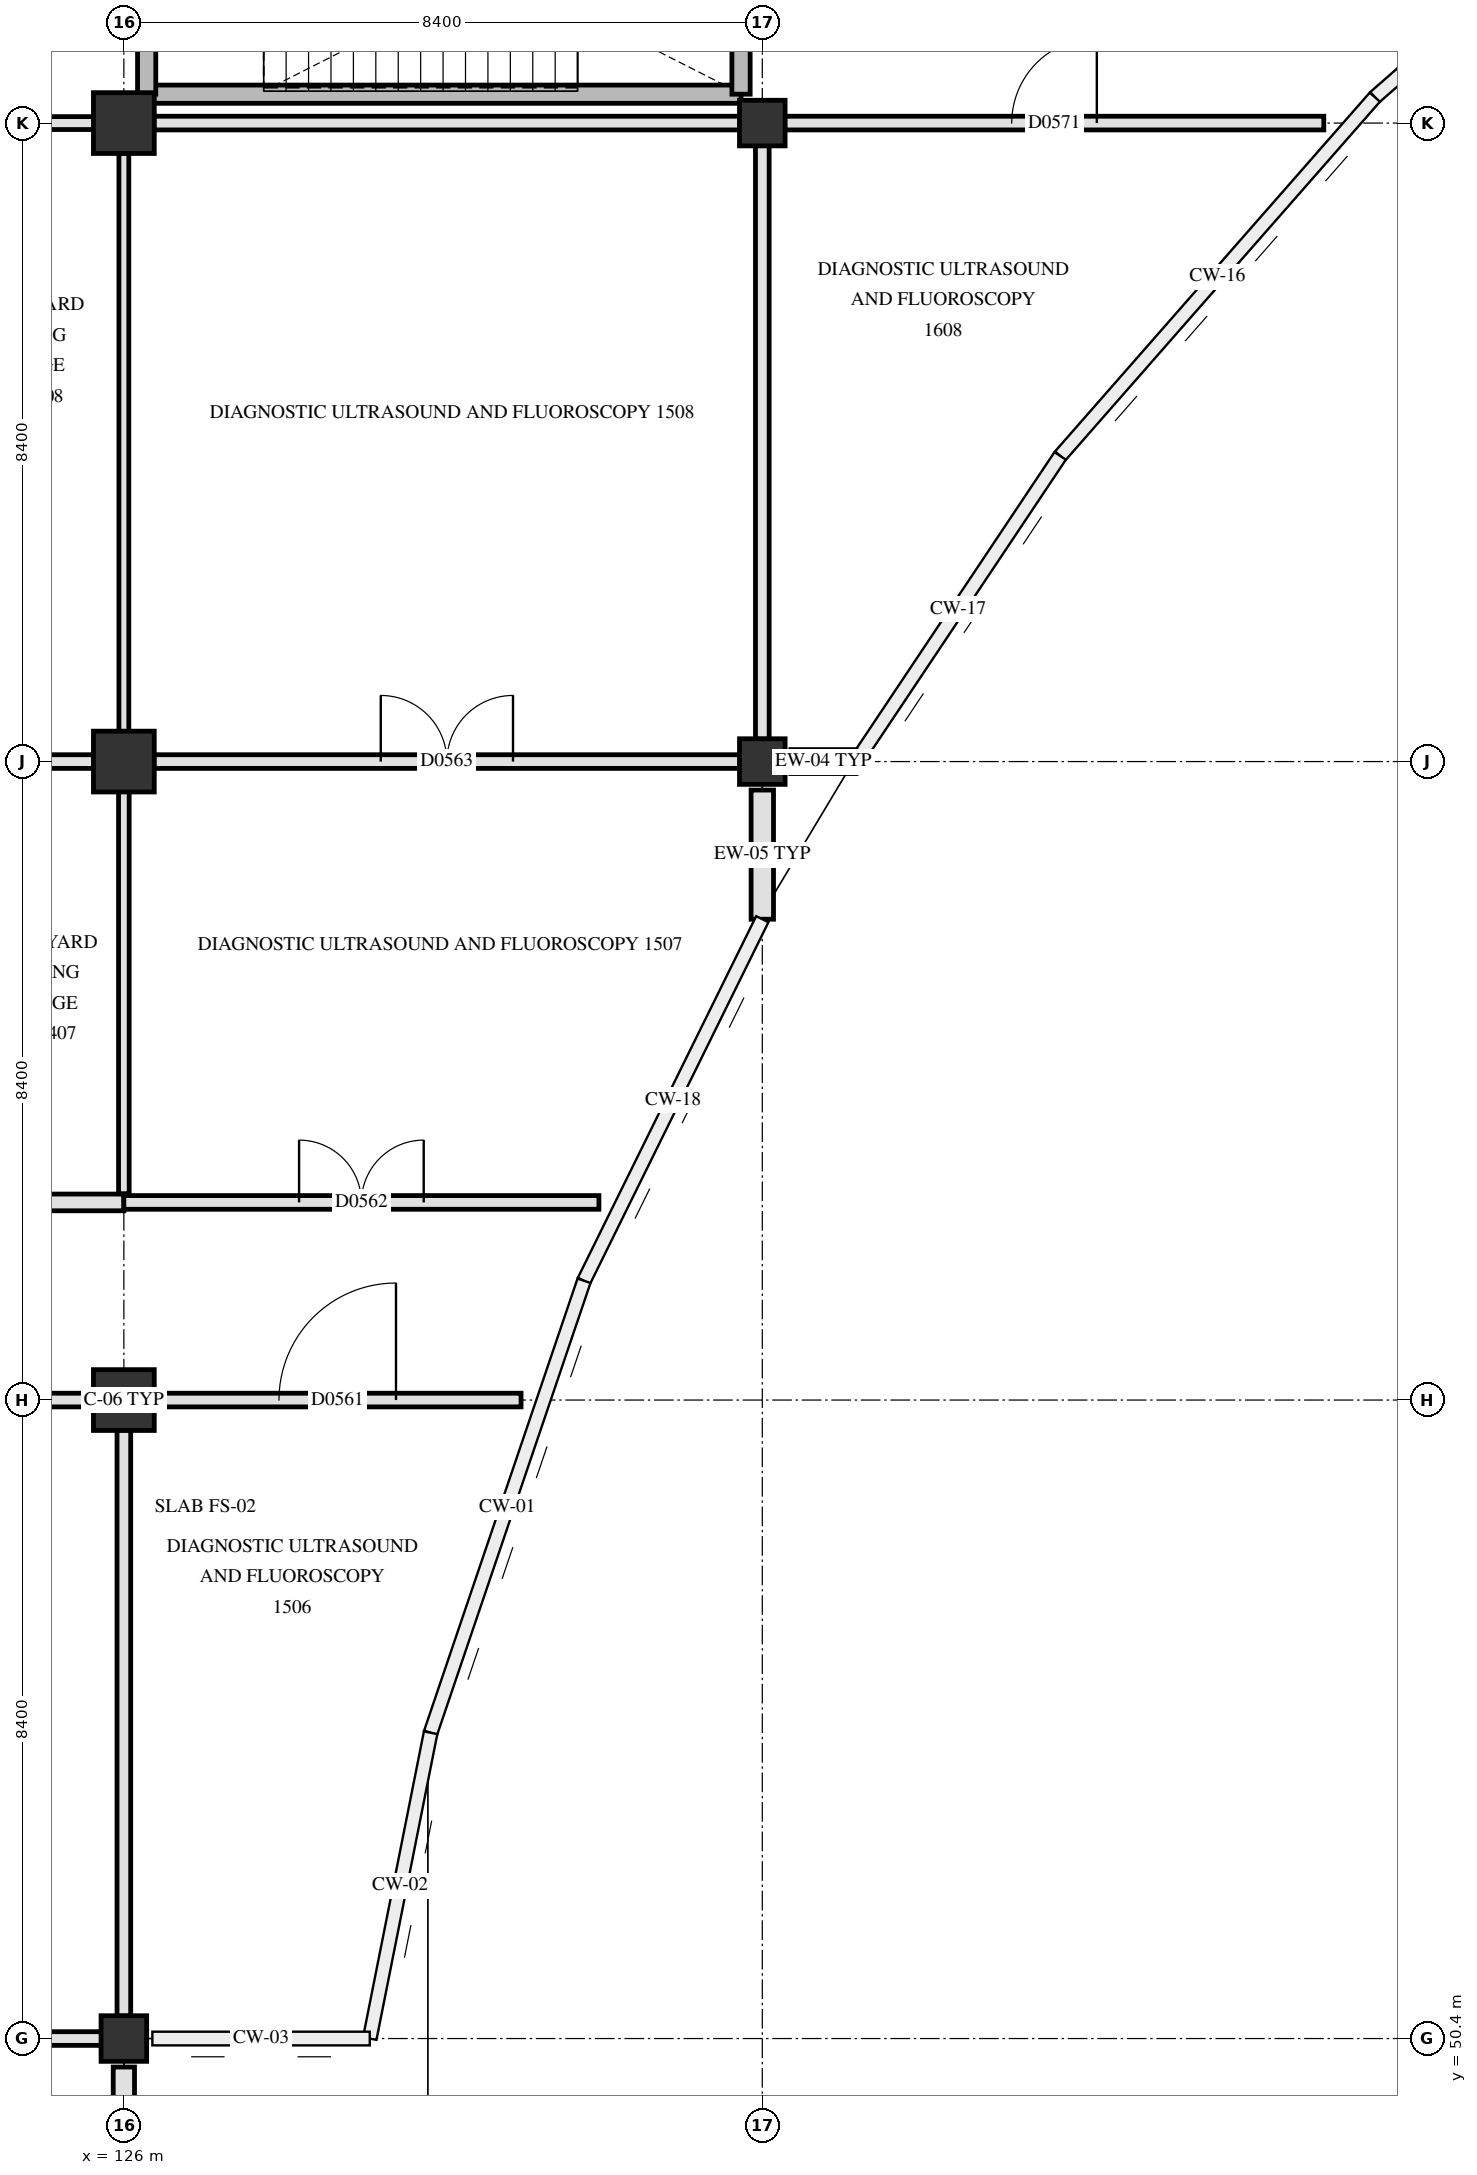
"""IFC4 building model, lengths in metres.
Left out: names, types, materials, properties, quantities, classifications, styles, units other than length and angle.
Written with IfcOpenShell. Run it as: python <this file> out.ifc"""

import sys

from ifc_helpers import new_model, si_unit, direction, frame, frame_2d, origin, origin_2d, place, context, subcontext, project, spatial, rectangle, circle, extrude, element, fill, save


model = new_model("IFC4")
c1 = context("Model", 3, precision=1e-05, world=origin(), true_north=direction((0.0, 1.0)))
c2 = subcontext(c1, "Body", "Model", "MODEL_VIEW")
j1 = project(units=[si_unit("LENGTHUNIT", "METRE"), si_unit("PLANEANGLEUNIT", "RADIAN")], contexts=[c1])
p1 = place(None, origin())
s1 = spatial("IfcSite", under=j1, at=p1, CompositionType="ELEMENT")
p2 = place(p1, origin())
s2 = spatial("IfcBuilding", under=s1, at=p2, CompositionType="ELEMENT")
p3 = place(p2, origin())
s3 = spatial("IfcBuildingStorey", under=s2, at=p3, CompositionType="ELEMENT", Elevation=0.0)
p4 = place(p3, frame((126.0, 50.4, 0.0), z_axis=(0.0, 0.0, 1.0), x_axis=(1.0, 0.0, 0.0)))
e1 = element("IfcColumn", 1, at=p4, inside=s3, PredefinedType="COLUMN", context=c2, shape_type="SweptSolid", body=[
    extrude(rectangle(XDim=0.6, YDim=0.6, at=origin_2d()), origin(), (0.0, 0.0, 1.0), 4.8),
])
for number, where, z_axis, x_axis in (
    (2, (126.0, 58.8, 0.0), (0.0, 0.0, 1.0), (1.0, 0.0, 0.0)),
    (3, (126.0, 67.2, 0.0), (0.0, 0.0, 1.0), (1.0, 0.0, 0.0)),
    (4, (126.0, 75.6, 0.0), (0.0, 0.0, 1.0), (1.0, 0.0, 0.0)),
):
    element("IfcColumn", number, at=place(p3, frame(where, z_axis=z_axis, x_axis=x_axis)), inside=s3, PredefinedType="COLUMN", context=c2, shape_type="SweptSolid", body=[
        extrude(circle(Radius=0.4, at=origin_2d()), origin(), (0.0, 0.0, 1.0), 4.8),
    ])
for number, where, z_axis, x_axis in (
    (5, (134.4, 67.2, 0.0), (0.0, 0.0, 1.0), (1.0, 0.0, 0.0)),
    (6, (134.4, 75.6, 0.0), (0.0, 0.0, 1.0), (1.0, 0.0, 0.0)),
):
    element("IfcColumn", number, at=place(p3, frame(where, z_axis=z_axis, x_axis=x_axis)), inside=s3, PredefinedType="COLUMN", context=c2, shape_type="SweptSolid", body=[
        extrude(rectangle(XDim=0.6, YDim=0.6, at=origin_2d()), origin(), (0.0, 0.0, 1.0), 4.8),
    ])
p5 = place(p3, frame((135.633, 67.2, 0.0), z_axis=(0.0, 0.0, 1.0), x_axis=(-1.0, 0.0, 0.0)))
e7 = element("IfcWall", 7, at=p5, inside=s3, PredefinedType="SOLIDWALL", context=c2, shape_type="SweptSolid", body=[
    extrude(rectangle(XDim=0.858, YDim=0.315, at=frame_2d((0.429, 0.0))), origin(), (0.0, 0.0, 1.0), 4.49),
])
p6 = place(p3, frame((134.4, 66.825, 0.0), z_axis=(0.0, 0.0, 1.0), x_axis=(0.0, -1.0, 0.0)))
e8 = element("IfcWall", 8, at=p6, inside=s3, PredefinedType="SOLIDWALL", context=c2, shape_type="SweptSolid", body=[
    extrude(rectangle(XDim=1.699, YDim=0.295, at=frame_2d((0.85, 0.0))), origin(), (0.0, 0.0, 1.0), 4.49),
])
p7 = place(p3, frame((126.0, 50.025, 0.0), z_axis=(0.0, 0.0, 1.0), x_axis=(0.0, -1.0, 0.0)))
e9 = element("IfcWall", 9, at=p7, inside=s3, PredefinedType="SOLIDWALL", context=c2, shape_type="SweptSolid", body=[
    extrude(rectangle(XDim=7.65, YDim=0.28, at=frame_2d((3.825, 0.0))), origin(), (0.0, 0.0, 1.0), 3.79),
])
p8 = place(p7, frame((1.312, 0.0, 0.85)))
e10 = element("IfcOpeningElement", 10, at=p8, cuts=e9, PredefinedType="OPENING", context=c2, shape_type="SweptSolid", body=[
    extrude(rectangle(XDim=1.2, YDim=1.42, at=frame_2d((0.6, 0.71))), frame((0.0, 0.15, 0.0), z_axis=(0.0, -1.0, 0.0), x_axis=(1.0, 0.0, 0.0)), (0.0, 0.0, 1.0), 0.3),
])
p9 = place(p7, frame((5.087, 0.0, 0.85)))
e11 = element("IfcOpeningElement", 11, at=p9, cuts=e9, PredefinedType="OPENING", context=c2, shape_type="SweptSolid", body=[
    extrude(rectangle(XDim=1.3, YDim=1.42, at=frame_2d((0.65, 0.71))), frame((0.0, 0.15, 0.0), z_axis=(0.0, -1.0, 0.0), x_axis=(1.0, 0.0, 0.0)), (0.0, 0.0, 1.0), 0.3),
])
p10 = place(p3, frame((126.3, 75.98, 0.0), z_axis=(0.0, 0.0, 1.0), x_axis=(1.0, 0.0, 0.0)))
e12 = element("IfcWall", 12, at=p10, inside=s3, PredefinedType="SHEAR", context=c2, shape_type="SweptSolid", body=[
    extrude(rectangle(XDim=7.82, YDim=0.24, at=frame_2d((3.91, 0.0))), origin(), (0.0, 0.0, 1.0), 4.5),
])
for number, where, z_axis, x_axis in (
    (13, (126.3, 75.98, 0.0), (0.0, 0.0, 1.0), (0.0, 1.0, 0.0)),
    (14, (134.12, 75.98, 0.0), (0.0, 0.0, 1.0), (0.0, 1.0, 0.0)),
):
    element("IfcWall", number, at=place(p3, frame(where, z_axis=z_axis, x_axis=x_axis)), inside=s3, PredefinedType="SHEAR", context=c2, shape_type="SweptSolid", body=[
        extrude(rectangle(XDim=3.32, YDim=0.24, at=frame_2d((1.66, 0.0))), origin(), (0.0, 0.0, 1.0), 4.5),
    ])
p11 = place(p3, frame((118.045, 50.4, 0.0), z_axis=(0.0, 0.0, 1.0), x_axis=(1.0, 0.0, 0.0)))
e15 = element("IfcWall", 15, at=p11, inside=s3, PredefinedType="PARTITIONING", context=c2, shape_type="SweptSolid", body=[
    extrude(rectangle(XDim=7.66, YDim=0.18, at=frame_2d((3.83, 0.0))), origin(), (0.0, 0.0, 1.0), 3.84),
])
p12 = place(p3, frame((117.995, 58.8, 0.0), z_axis=(0.0, 0.0, 1.0), x_axis=(1.0, 0.0, 0.0)))
e16 = element("IfcWall", 16, at=p12, inside=s3, PredefinedType="PARTITIONING", context=c2, shape_type="SweptSolid", body=[
    extrude(rectangle(XDim=7.61, YDim=0.18, at=frame_2d((3.805, 0.0))), origin(), (0.0, 0.0, 1.0), 3.84),
])
p13 = place(p12, frame((2.855, 0.0, 0.0)))
e17 = element("IfcOpeningElement", 17, at=p13, cuts=e16, PredefinedType="OPENING", context=c2, shape_type="SweptSolid", body=[
    extrude(rectangle(XDim=1.9, YDim=2.3, at=frame_2d((0.95, 1.15))), frame((0.0, 0.1, 0.0), z_axis=(0.0, -1.0, 0.0), x_axis=(1.0, 0.0, 0.0)), (0.0, 0.0, 1.0), 0.2),
])
p14 = place(p3, frame((126.395, 58.8, 0.0), z_axis=(0.0, 0.0, 1.0), x_axis=(1.0, 0.0, 0.0)))
e18 = element("IfcWall", 18, at=p14, inside=s3, PredefinedType="PARTITIONING", context=c2, shape_type="SweptSolid", body=[
    extrude(rectangle(XDim=4.831, YDim=0.18, at=frame_2d((2.416, 0.0))), origin(), (0.0, 0.0, 1.0), 4.49),
])
p15 = place(p14, frame((1.646, 0.0, 0.0)))
e19 = element("IfcOpeningElement", 19, at=p15, cuts=e18, PredefinedType="OPENING", context=c2, shape_type="SweptSolid", body=[
    extrude(rectangle(XDim=1.54, YDim=2.24, at=frame_2d((0.77, 1.12))), frame((0.0, 0.1, 0.0), z_axis=(0.0, -1.0, 0.0), x_axis=(1.0, 0.0, 0.0)), (0.0, 0.0, 1.0), 0.2),
])
p16 = place(p3, frame((121.075, 61.4, 0.0), z_axis=(0.0, 0.0, 1.0), x_axis=(1.0, 0.0, 0.0)))
e20 = element("IfcWall", 20, at=p16, inside=s3, PredefinedType="PARTITIONING", context=c2, shape_type="SweptSolid", body=[
    extrude(rectangle(XDim=4.925, YDim=0.22, at=frame_2d((2.462, 0.0))), origin(), (0.0, 0.0, 1.0), 3.89),
])
p17 = place(p16, frame((1.613, 0.0, 0.0)))
e21 = element("IfcOpeningElement", 21, at=p17, cuts=e20, PredefinedType="OPENING", context=c2, shape_type="SweptSolid", body=[
    extrude(rectangle(XDim=1.7, YDim=2.25, at=frame_2d((0.85, 1.125))), frame((0.0, 0.12, 0.0), z_axis=(0.0, -1.0, 0.0), x_axis=(1.0, 0.0, 0.0)), (0.0, 0.0, 1.0), 0.24),
])
p18 = place(p3, frame((126.0, 61.4, 0.0), z_axis=(0.0, 0.0, 1.0), x_axis=(1.0, 0.0, 0.0)))
e22 = element("IfcWall", 22, at=p18, inside=s3, PredefinedType="PARTITIONING", context=c2, shape_type="SweptSolid", body=[
    extrude(rectangle(XDim=6.25, YDim=0.18, at=frame_2d((3.125, 0.0))), origin(), (0.0, 0.0, 1.0), 3.89),
])
p19 = place(p18, frame((2.305, 0.0, 0.0)))
e23 = element("IfcOpeningElement", 23, at=p19, cuts=e22, PredefinedType="OPENING", context=c2, shape_type="SweptSolid", body=[
    extrude(rectangle(XDim=1.64, YDim=2.28, at=frame_2d((0.82, 1.14))), frame((0.0, 0.1, 0.0), z_axis=(0.0, -1.0, 0.0), x_axis=(1.0, 0.0, 0.0)), (0.0, 0.0, 1.0), 0.2),
])
p20 = place(p3, frame((124.1, 67.2, 0.0), z_axis=(0.0, 0.0, 1.0), x_axis=(1.0, 0.0, 0.0)))
e24 = element("IfcWall", 24, at=p20, inside=s3, PredefinedType="PARTITIONING", context=c2, shape_type="SweptSolid", body=[
    extrude(rectangle(XDim=1.505, YDim=0.18, at=frame_2d((0.752, 0.0))), origin(), (0.0, 0.0, 1.0), 4.49),
])
p21 = place(p3, frame((126.395, 67.2, 0.0), z_axis=(0.0, 0.0, 1.0), x_axis=(1.0, 0.0, 0.0)))
e25 = element("IfcWall", 25, at=p21, inside=s3, PredefinedType="PARTITIONING", context=c2, shape_type="SweptSolid", body=[
    extrude(rectangle(XDim=7.71, YDim=0.18, at=frame_2d((3.855, 0.0))), origin(), (0.0, 0.0, 1.0), 3.84),
])
p22 = place(p21, frame((2.985, 0.0, 0.0)))
e26 = element("IfcOpeningElement", 26, at=p22, cuts=e25, PredefinedType="OPENING", context=c2, shape_type="SweptSolid", body=[
    extrude(rectangle(XDim=1.74, YDim=2.24, at=frame_2d((0.87, 1.12))), frame((0.0, 0.1, 0.0), z_axis=(0.0, -1.0, 0.0), x_axis=(1.0, 0.0, 0.0)), (0.0, 0.0, 1.0), 0.2),
])
p23 = place(p3, frame((117.995, 75.6, 0.0), z_axis=(0.0, 0.0, 1.0), x_axis=(1.0, 0.0, 0.0)))
e27 = element("IfcWall", 27, at=p23, inside=s3, PredefinedType="PARTITIONING", context=c2, shape_type="SweptSolid", body=[
    extrude(rectangle(XDim=7.61, YDim=0.17, at=frame_2d((3.805, 0.0))), origin(), (0.0, 0.0, 1.0), 3.84),
])
p24 = place(p23, frame((3.305, 0.0, 0.0)))
e28 = element("IfcOpeningElement", 28, at=p24, cuts=e27, PredefinedType="OPENING", context=c2, shape_type="SweptSolid", body=[
    extrude(rectangle(XDim=1.0, YDim=2.15, at=frame_2d((0.5, 1.075))), frame((0.0, 0.095, 0.0), z_axis=(0.0, -1.0, 0.0), x_axis=(1.0, 0.0, 0.0)), (0.0, 0.0, 1.0), 0.19),
])
p25 = place(p3, frame((126.395, 75.6, 0.0), z_axis=(0.0, 0.0, 1.0), x_axis=(1.0, 0.0, 0.0)))
e29 = element("IfcWall", 29, at=p25, inside=s3, PredefinedType="PARTITIONING", context=c2, shape_type="SweptSolid", body=[
    extrude(rectangle(XDim=7.71, YDim=0.18, at=frame_2d((3.855, 0.0))), origin(), (0.0, 0.0, 1.0), 3.84),
])
p26 = place(p3, frame((134.695, 75.6, 0.0), z_axis=(0.0, 0.0, 1.0), x_axis=(1.0, 0.0, 0.0)))
e30 = element("IfcWall", 30, at=p26, inside=s3, PredefinedType="PARTITIONING", context=c2, shape_type="SweptSolid", body=[
    extrude(rectangle(XDim=7.093, YDim=0.18, at=frame_2d((3.546, 0.0))), origin(), (0.0, 0.0, 1.0), 4.49),
])
p27 = place(p26, frame((2.986, 0.0, 0.0)))
e31 = element("IfcOpeningElement", 31, at=p27, cuts=e30, PredefinedType="OPENING", context=c2, shape_type="SweptSolid", body=[
    extrude(rectangle(XDim=1.12, YDim=2.18, at=frame_2d((0.56, 1.09))), frame((0.0, 0.1, 0.0), z_axis=(0.0, -1.0, 0.0), x_axis=(1.0, 0.0, 0.0)), (0.0, 0.0, 1.0), 0.2),
])
p28 = place(p3, frame((126.0, 50.695, 0.0), z_axis=(0.0, 0.0, 1.0), x_axis=(0.0, 1.0, 0.0)))
e32 = element("IfcWall", 32, at=p28, inside=s3, PredefinedType="PARTITIONING", context=c2, shape_type="SweptSolid", body=[
    extrude(rectangle(XDim=7.71, YDim=0.18, at=frame_2d((3.855, 0.0))), origin(), (0.0, 0.0, 1.0), 3.89),
])
p29 = place(p3, frame((126.0, 61.515, 0.0), z_axis=(0.0, 0.0, 1.0), x_axis=(0.0, 1.0, 0.0)))
e33 = element("IfcWall", 33, at=p29, inside=s3, PredefinedType="PARTITIONING", context=c2, shape_type="SweptSolid", body=[
    extrude(rectangle(XDim=5.29, YDim=0.14, at=frame_2d((2.645, 0.0))), origin(), (0.0, 0.0, 1.0), 3.89),
])
p30 = place(p3, frame((126.0, 67.595, 0.0), z_axis=(0.0, 0.0, 1.0), x_axis=(0.0, 1.0, 0.0)))
e34 = element("IfcWall", 34, at=p30, inside=s3, PredefinedType="PARTITIONING", context=c2, shape_type="SweptSolid", body=[
    extrude(rectangle(XDim=7.61, YDim=0.13, at=frame_2d((3.805, 0.0))), origin(), (0.0, 0.0, 1.0), 3.89),
])
p31 = place(p3, frame((134.4, 67.495, 0.0), z_axis=(0.0, 0.0, 1.0), x_axis=(0.0, 1.0, 0.0)))
e35 = element("IfcWall", 35, at=p31, inside=s3, PredefinedType="PARTITIONING", context=c2, shape_type="SweptSolid", body=[
    extrude(rectangle(XDim=7.81, YDim=0.18, at=frame_2d((3.905, 0.0))), origin(), (0.0, 0.0, 1.0), 3.89),
])
p32 = place(p15, origin())
e36 = element("IfcDoor", 36, at=p32, inside=s3, OperationType="SINGLE_SWING_RIGHT", PredefinedType="DOOR", context=c2, shape_type="SweptSolid", body=[
    extrude(rectangle(XDim=1.54, YDim=2.24, at=frame_2d((0.77, 1.12))), frame((0.0, 0.025, 0.0), z_axis=(0.0, -1.0, 0.0), x_axis=(1.0, 0.0, 0.0)), (0.0, 0.0, 1.0), 0.05),
])
fill(e19, e36)
p33 = place(p19, origin())
e37 = element("IfcDoor", 37, at=p33, inside=s3, OperationType="DOUBLE_SWING_LEFT", PredefinedType="DOOR", context=c2, shape_type="SweptSolid", body=[
    extrude(rectangle(XDim=1.64, YDim=2.28, at=frame_2d((0.82, 1.14))), frame((0.0, 0.025, 0.0), z_axis=(0.0, -1.0, 0.0), x_axis=(1.0, 0.0, 0.0)), (0.0, 0.0, 1.0), 0.05),
])
fill(e23, e37)
p34 = place(p22, origin())
e38 = element("IfcDoor", 38, at=p34, inside=s3, OperationType="DOUBLE_SWING_RIGHT", PredefinedType="DOOR", context=c2, shape_type="SweptSolid", body=[
    extrude(rectangle(XDim=1.74, YDim=2.24, at=frame_2d((0.87, 1.12))), frame((0.0, 0.025, 0.0), z_axis=(0.0, -1.0, 0.0), x_axis=(1.0, 0.0, 0.0)), (0.0, 0.0, 1.0), 0.05),
])
fill(e26, e38)
p35 = place(p27, origin())
e39 = element("IfcDoor", 39, at=p35, inside=s3, OperationType="SINGLE_SWING_RIGHT", PredefinedType="DOOR", context=c2, shape_type="SweptSolid", body=[
    extrude(rectangle(XDim=1.12, YDim=2.18, at=frame_2d((0.56, 1.09))), frame((0.0, 0.025, 0.0), z_axis=(0.0, -1.0, 0.0), x_axis=(1.0, 0.0, 0.0)), (0.0, 0.0, 1.0), 0.05),
])
fill(e31, e39)
save(model, sys.argv[1])
